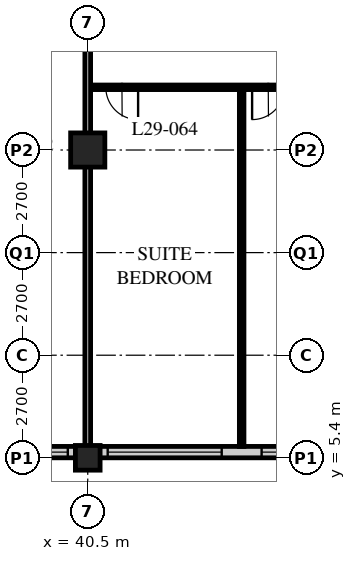
"""IFC4 building model, lengths in metres.
Left out: names, types, materials, properties, quantities, classifications, styles, units other than length and angle.
Written with IfcOpenShell. Run it as: python <this file> out.ifc"""

import sys

from ifc_helpers import new_model, si_unit, direction, frame, frame_2d, origin, origin_2d, place, context, subcontext, project, spatial, rectangle, hollow_rectangle, extrude, element, fill, save


model = new_model("IFC4")
c1 = context("Model", 3, precision=1e-05, world=origin(), true_north=direction((0.0, 1.0)))
c2 = subcontext(c1, "Body", "Model", "MODEL_VIEW")
j1 = project(units=[si_unit("LENGTHUNIT", "METRE"), si_unit("PLANEANGLEUNIT", "RADIAN")], contexts=[c1])
p1 = place(None, origin())
s1 = spatial("IfcSite", under=j1, at=p1, CompositionType="ELEMENT")
p2 = place(p1, origin())
s2 = spatial("IfcBuilding", under=s1, at=p2, CompositionType="ELEMENT")
p3 = place(p2, frame((0.0, 0.0, 117.0)))
s3 = spatial("IfcBuildingStorey", under=s2, at=p3, CompositionType="ELEMENT", Elevation=117.0)
p4 = place(p3, frame((40.5, 5.4, 0.0), z_axis=(0.0, 0.0, 1.0), x_axis=(1.0, 0.0, 0.0)))
e1 = element("IfcColumn", 1, at=p4, inside=s3, PredefinedType="COLUMN", context=c2, shape_type="SweptSolid", body=[
    extrude(hollow_rectangle(XDim=0.65, YDim=0.65, WallThickness=0.055, at=origin_2d()), origin(), (0.0, 0.0, 1.0), 3.4),
])
p5 = place(p3, frame((40.5, 13.5, 0.0), z_axis=(0.0, 0.0, 1.0), x_axis=(1.0, 0.0, 0.0)))
e2 = element("IfcColumn", 2, at=p5, inside=s3, PredefinedType="COLUMN", context=c2, shape_type="SweptSolid", body=[
    extrude(hollow_rectangle(XDim=0.9, YDim=0.9, WallThickness=0.09, at=origin_2d()), origin(), (0.0, 0.0, 1.0), 3.4),
])
p6 = place(p3, frame((8.4, 5.55, 0.0), z_axis=(0.0, 0.0, 1.0), x_axis=(1.0, 0.0, 0.0)))
e3 = element("IfcWall", 3, at=p6, inside=s3, PredefinedType="SOLIDWALL", context=c2, shape_type="SweptSolid", body=[
    extrude(rectangle(XDim=40.2, YDim=0.3, at=frame_2d((20.1, 0.0))), origin(), (0.0, 0.0, 1.0), 3.19),
])
p7 = place(p6, frame((0.225, 0.0, 0.9)))
e4 = element("IfcOpeningElement", 4, at=p7, cuts=e3, PredefinedType="OPENING", context=c2, shape_type="SweptSolid", body=[
    extrude(rectangle(XDim=3.0, YDim=2.0, at=frame_2d((1.5, 1.0))), frame((0.0, 0.16, 0.0), z_axis=(0.0, -1.0, 0.0), x_axis=(1.0, 0.0, 0.0)), (0.0, 0.0, 1.0), 0.32),
])
p8 = place(p6, frame((4.275, 0.0, 0.9)))
e5 = element("IfcOpeningElement", 5, at=p8, cuts=e3, PredefinedType="OPENING", context=c2, shape_type="SweptSolid", body=[
    extrude(rectangle(XDim=3.0, YDim=2.0, at=frame_2d((1.5, 1.0))), frame((0.0, 0.16, 0.0), z_axis=(0.0, -1.0, 0.0), x_axis=(1.0, 0.0, 0.0)), (0.0, 0.0, 1.0), 0.32),
])
p9 = place(p6, frame((8.325, 0.0, 0.9)))
e6 = element("IfcOpeningElement", 6, at=p9, cuts=e3, PredefinedType="OPENING", context=c2, shape_type="SweptSolid", body=[
    extrude(rectangle(XDim=3.0, YDim=2.0, at=frame_2d((1.5, 1.0))), frame((0.0, 0.16, 0.0), z_axis=(0.0, -1.0, 0.0), x_axis=(1.0, 0.0, 0.0)), (0.0, 0.0, 1.0), 0.32),
])
p10 = place(p6, frame((12.375, 0.0, 0.9)))
e7 = element("IfcOpeningElement", 7, at=p10, cuts=e3, PredefinedType="OPENING", context=c2, shape_type="SweptSolid", body=[
    extrude(rectangle(XDim=3.0, YDim=2.0, at=frame_2d((1.5, 1.0))), frame((0.0, 0.16, 0.0), z_axis=(0.0, -1.0, 0.0), x_axis=(1.0, 0.0, 0.0)), (0.0, 0.0, 1.0), 0.32),
])
p11 = place(p6, frame((16.425, 0.0, 0.9)))
e8 = element("IfcOpeningElement", 8, at=p11, cuts=e3, PredefinedType="OPENING", context=c2, shape_type="SweptSolid", body=[
    extrude(rectangle(XDim=3.0, YDim=2.0, at=frame_2d((1.5, 1.0))), frame((0.0, 0.16, 0.0), z_axis=(0.0, -1.0, 0.0), x_axis=(1.0, 0.0, 0.0)), (0.0, 0.0, 1.0), 0.32),
])
p12 = place(p6, frame((20.475, 0.0, 0.9)))
e9 = element("IfcOpeningElement", 9, at=p12, cuts=e3, PredefinedType="OPENING", context=c2, shape_type="SweptSolid", body=[
    extrude(rectangle(XDim=3.0, YDim=2.0, at=frame_2d((1.5, 1.0))), frame((0.0, 0.16, 0.0), z_axis=(0.0, -1.0, 0.0), x_axis=(1.0, 0.0, 0.0)), (0.0, 0.0, 1.0), 0.32),
])
p13 = place(p6, frame((24.525, 0.0, 0.9)))
e10 = element("IfcOpeningElement", 10, at=p13, cuts=e3, PredefinedType="OPENING", context=c2, shape_type="SweptSolid", body=[
    extrude(rectangle(XDim=3.0, YDim=2.0, at=frame_2d((1.5, 1.0))), frame((0.0, 0.16, 0.0), z_axis=(0.0, -1.0, 0.0), x_axis=(1.0, 0.0, 0.0)), (0.0, 0.0, 1.0), 0.32),
])
p14 = place(p6, frame((28.575, 0.0, 0.9)))
e11 = element("IfcOpeningElement", 11, at=p14, cuts=e3, PredefinedType="OPENING", context=c2, shape_type="SweptSolid", body=[
    extrude(rectangle(XDim=3.0, YDim=2.0, at=frame_2d((1.5, 1.0))), frame((0.0, 0.16, 0.0), z_axis=(0.0, -1.0, 0.0), x_axis=(1.0, 0.0, 0.0)), (0.0, 0.0, 1.0), 0.32),
])
p15 = place(p6, frame((32.625, 0.0, 0.9)))
e12 = element("IfcOpeningElement", 12, at=p15, cuts=e3, PredefinedType="OPENING", context=c2, shape_type="SweptSolid", body=[
    extrude(rectangle(XDim=3.0, YDim=2.0, at=frame_2d((1.5, 1.0))), frame((0.0, 0.16, 0.0), z_axis=(0.0, -1.0, 0.0), x_axis=(1.0, 0.0, 0.0)), (0.0, 0.0, 1.0), 0.32),
])
p16 = place(p6, frame((36.675, 0.0, 0.9)))
e13 = element("IfcOpeningElement", 13, at=p16, cuts=e3, PredefinedType="OPENING", context=c2, shape_type="SweptSolid", body=[
    extrude(rectangle(XDim=3.0, YDim=2.0, at=frame_2d((1.5, 1.0))), frame((0.0, 0.16, 0.0), z_axis=(0.0, -1.0, 0.0), x_axis=(1.0, 0.0, 0.0)), (0.0, 0.0, 1.0), 0.32),
])
p17 = place(p3, frame((40.5, 15.15, 0.0), z_axis=(0.0, 0.0, 1.0), x_axis=(1.0, 0.0, 0.0)))
e14 = element("IfcWall", 14, at=p17, inside=s3, PredefinedType="PARTITIONING", context=c2, shape_type="SweptSolid", body=[
    extrude(rectangle(XDim=8.05, YDim=0.12, at=frame_2d((4.025, 0.0))), origin(), (0.0, 0.0, 1.0), 3.19),
])
p18 = place(p17, frame((0.475, 0.0, 0.0)))
e15 = element("IfcOpeningElement", 15, at=p18, cuts=e14, PredefinedType="OPENING", context=c2, shape_type="SweptSolid", body=[
    extrude(rectangle(XDim=0.85, YDim=2.1, at=frame_2d((0.425, 1.05))), frame((0.0, 0.07, 0.0), z_axis=(0.0, -1.0, 0.0), x_axis=(1.0, 0.0, 0.0)), (0.0, 0.0, 1.0), 0.14),
])
p19 = place(p17, frame((4.325, 0.0, 0.0)))
e16 = element("IfcOpeningElement", 16, at=p19, cuts=e14, PredefinedType="OPENING", context=c2, shape_type="SweptSolid", body=[
    extrude(rectangle(XDim=0.85, YDim=2.1, at=frame_2d((0.425, 1.05))), frame((0.0, 0.07, 0.0), z_axis=(0.0, -1.0, 0.0), x_axis=(1.0, 0.0, 0.0)), (0.0, 0.0, 1.0), 0.14),
])
p20 = place(p3, frame((44.55, 15.15, 0.0), z_axis=(0.0, 0.0, 1.0), x_axis=(0.0, -1.0, 0.0)))
e17 = element("IfcWall", 17, at=p20, inside=s3, PredefinedType="PARTITIONING", context=c2, shape_type="SweptSolid", body=[
    extrude(rectangle(XDim=9.45, YDim=0.12, at=frame_2d((4.725, 0.0))), origin(), (0.0, 0.0, 1.0), 3.19),
])
p21 = place(p3, frame((40.5, 17.55, 0.0), z_axis=(0.0, 0.0, 1.0), x_axis=(0.0, -1.0, 0.0)))
e18 = element("IfcWall", 18, at=p21, inside=s3, PredefinedType="PARTITIONING", context=c2, shape_type="SweptSolid", body=[
    extrude(rectangle(XDim=11.85, YDim=0.15, at=frame_2d((5.925, 0.0))), origin(), (0.0, 0.0, 1.0), 2.578),
])
p22 = place(p14, origin())
e19 = element("IfcWindow", 19, at=p22, inside=s3, PartitioningType="SINGLE_PANEL", PredefinedType="WINDOW", context=c2, shape_type="SweptSolid", body=[
    extrude(rectangle(XDim=3.0, YDim=2.0, at=frame_2d((1.5, 1.0))), frame((0.0, 0.03, 0.0), z_axis=(0.0, -1.0, 0.0), x_axis=(1.0, 0.0, 0.0)), (0.0, 0.0, 1.0), 0.06),
])
fill(e11, e19)
p23 = place(p15, origin())
e20 = element("IfcWindow", 20, at=p23, inside=s3, PartitioningType="SINGLE_PANEL", PredefinedType="WINDOW", context=c2, shape_type="SweptSolid", body=[
    extrude(rectangle(XDim=3.0, YDim=2.0, at=frame_2d((1.5, 1.0))), frame((0.0, 0.03, 0.0), z_axis=(0.0, -1.0, 0.0), x_axis=(1.0, 0.0, 0.0)), (0.0, 0.0, 1.0), 0.06),
])
fill(e12, e20)
p24 = place(p16, origin())
e21 = element("IfcWindow", 21, at=p24, inside=s3, PartitioningType="SINGLE_PANEL", PredefinedType="WINDOW", context=c2, shape_type="SweptSolid", body=[
    extrude(rectangle(XDim=3.0, YDim=2.0, at=frame_2d((1.5, 1.0))), frame((0.0, 0.03, 0.0), z_axis=(0.0, -1.0, 0.0), x_axis=(1.0, 0.0, 0.0)), (0.0, 0.0, 1.0), 0.06),
])
fill(e13, e21)
p25 = place(p18, origin())
e22 = element("IfcDoor", 22, at=p25, inside=s3, OperationType="SINGLE_SWING_LEFT", PredefinedType="DOOR", context=c2, shape_type="SweptSolid", body=[
    extrude(rectangle(XDim=0.85, YDim=2.1, at=frame_2d((0.425, 1.05))), frame((0.0, 0.025, 0.0), z_axis=(0.0, -1.0, 0.0), x_axis=(1.0, 0.0, 0.0)), (0.0, 0.0, 1.0), 0.05),
])
fill(e15, e22)
p26 = place(p19, origin())
e23 = element("IfcDoor", 23, at=p26, inside=s3, OperationType="SINGLE_SWING_RIGHT", PredefinedType="DOOR", context=c2, shape_type="SweptSolid", body=[
    extrude(rectangle(XDim=0.85, YDim=2.1, at=frame_2d((0.425, 1.05))), frame((0.0, 0.025, 0.0), z_axis=(0.0, -1.0, 0.0), x_axis=(1.0, 0.0, 0.0)), (0.0, 0.0, 1.0), 0.05),
])
fill(e16, e23)
save(model, sys.argv[1])
